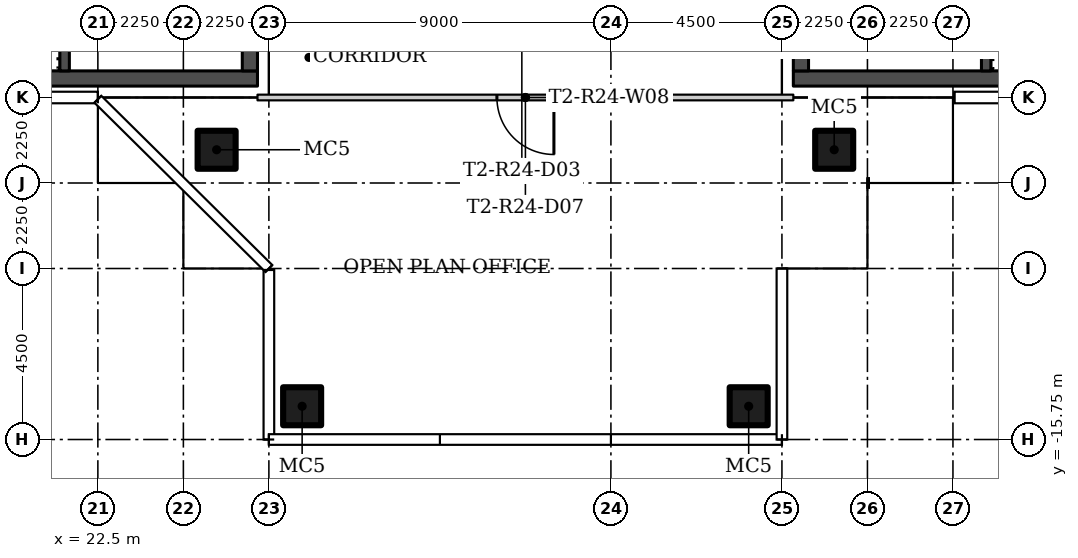
"""IFC4 building model, lengths in metres.
Left out: names, types, materials, properties, quantities, classifications, styles, units other than length and angle.
Written with IfcOpenShell. Run it as: python <this file> out.ifc"""

import sys

from ifc_helpers import new_model, si_unit, direction, frame, frame_2d, origin, origin_2d, place, context, subcontext, project, spatial, rectangle, hollow_rectangle, extrude, element, fill, save


model = new_model("IFC4")
c1 = context("Model", 3, precision=1e-05, world=origin(), true_north=direction((0.0, 1.0)))
c2 = subcontext(c1, "Body", "Model", "MODEL_VIEW")
j1 = project(units=[si_unit("LENGTHUNIT", "METRE"), si_unit("PLANEANGLEUNIT", "RADIAN")], contexts=[c1])
p1 = place(None, origin())
s1 = spatial("IfcSite", under=j1, at=p1, CompositionType="ELEMENT")
p2 = place(p1, origin())
s2 = spatial("IfcBuilding", under=s1, at=p2, CompositionType="ELEMENT")
p3 = place(p2, frame((0.0, 0.0, 221.7)))
s3 = spatial("IfcBuildingStorey", under=s2, at=p3, CompositionType="ELEMENT", Elevation=221.7)
for number, where in (
    (1, (25.625, -8.125, 0.0)),
    (2, (41.875, -8.125, 0.0)),
    (3, (39.625, -14.875, 0.0)),
    (4, (27.875, -14.875, 0.0)),
):
    element("IfcColumn", number, at=place(p3, frame(where)), inside=s3, PredefinedType="COLUMN", context=c2, shape_type="SweptSolid", body=[
        extrude(hollow_rectangle(XDim=1.0, YDim=1.0, WallThickness=0.04, at=origin_2d()), origin(), (0.0, 0.0, 1.0), 3.45),
    ])
p4 = place(p3, frame((40.8, -6.75, 0.0), z_axis=(0.0, 0.0, 1.0), x_axis=(-1.0, 0.0, 0.0)))
e5 = element("IfcWall", 5, at=p4, inside=s3, PredefinedType="PARTITIONING", context=c2, shape_type="SweptSolid", body=[
    extrude(rectangle(XDim=14.1, YDim=0.15, at=frame_2d((7.05, 0.0))), origin(), (0.0, 0.0, 1.0), 3.45),
])
p5 = place(p4, frame((6.3, 0.0, 0.0)))
e6 = element("IfcOpeningElement", 6, at=p5, cuts=e5, PredefinedType="OPENING", context=c2, shape_type="SweptSolid", body=[
    extrude(rectangle(XDim=1.5, YDim=2.1, at=frame_2d((0.75, 1.05))), frame((0.0, 0.085, 0.0), z_axis=(0.0, -1.0, 0.0), x_axis=(1.0, 0.0, 0.0)), (0.0, 0.0, 1.0), 0.17),
])
p6 = place(p3, frame((13.8, -6.25, 0.0)))
e7 = element("IfcWall", 7, at=p6, inside=s3, PredefinedType="SHEAR", context=c2, shape_type="SweptSolid", body=[
    extrude(rectangle(XDim=12.9, YDim=0.4, at=frame_2d((6.45, 0.0))), origin(), (0.0, 0.0, 1.0), 3.45),
])
p7 = place(p3, frame((26.5, 6.05, 0.0), z_axis=(0.0, 0.0, 1.0), x_axis=(0.0, -1.0, 0.0)))
e8 = element("IfcWall", 8, at=p7, inside=s3, PredefinedType="SHEAR", context=c2, shape_type="SweptSolid", body=[
    extrude(rectangle(XDim=12.1, YDim=0.4, at=frame_2d((6.05, 0.0))), origin(), (0.0, 0.0, 1.0), 3.45),
])
p8 = place(p7, frame((10.1, 0.0, 0.0)))
e9 = element("IfcOpeningElement", 9, at=p8, cuts=e8, PredefinedType="OPENING", context=c2, shape_type="SweptSolid", body=[
    extrude(rectangle(XDim=1.2, YDim=2.1, at=frame_2d((0.6, 1.05))), frame((0.0, 0.21, 0.0), z_axis=(0.0, -1.0, 0.0), x_axis=(1.0, 0.0, 0.0)), (0.0, 0.0, 1.0), 0.42),
])
p9 = place(p7, frame((3.9, 0.0, 0.0)))
e10 = element("IfcOpeningElement", 10, at=p9, cuts=e8, PredefinedType="OPENING", context=c2, shape_type="SweptSolid", body=[
    extrude(rectangle(XDim=1.8, YDim=2.4, at=frame_2d((0.9, 1.2))), frame((0.0, 0.21, 0.0), z_axis=(0.0, -1.0, 0.0), x_axis=(1.0, 0.0, 0.0)), (0.0, 0.0, 1.0), 0.42),
])
p10 = place(p3, frame((21.625, -6.05, 0.0), z_axis=(0.0, 0.0, 1.0), x_axis=(0.0, 1.0, 0.0)))
e11 = element("IfcWall", 11, at=p10, inside=s3, PredefinedType="SHEAR", context=c2, shape_type="SweptSolid", body=[
    extrude(rectangle(XDim=2.55, YDim=0.25, at=frame_2d((1.275, 0.0))), origin(), (0.0, 0.0, 1.0), 3.45),
])
p11 = place(p3, frame((53.7, -6.25, 0.0), z_axis=(0.0, 0.0, 1.0), x_axis=(-1.0, 0.0, 0.0)))
e12 = element("IfcWall", 12, at=p11, inside=s3, PredefinedType="SHEAR", context=c2, shape_type="SweptSolid", body=[
    extrude(rectangle(XDim=12.9, YDim=0.4, at=frame_2d((6.45, 0.0))), origin(), (0.0, 0.0, 1.0), 3.45),
])
p12 = place(p3, frame((41.0, -6.05, 0.0), z_axis=(0.0, 0.0, 1.0), x_axis=(0.0, 1.0, 0.0)))
e13 = element("IfcWall", 13, at=p12, inside=s3, PredefinedType="SHEAR", context=c2, shape_type="SweptSolid", body=[
    extrude(rectangle(XDim=12.1, YDim=0.4, at=frame_2d((6.05, 0.0))), origin(), (0.0, 0.0, 1.0), 3.45),
])
p13 = place(p12, frame((0.8, 0.0, 0.0)))
e14 = element("IfcOpeningElement", 14, at=p13, cuts=e13, PredefinedType="OPENING", context=c2, shape_type="SweptSolid", body=[
    extrude(rectangle(XDim=1.2, YDim=2.1, at=frame_2d((0.6, 1.05))), frame((0.0, 0.21, 0.0), z_axis=(0.0, -1.0, 0.0), x_axis=(1.0, 0.0, 0.0)), (0.0, 0.0, 1.0), 0.42),
])
p14 = place(p12, frame((6.4, 0.0, 0.0)))
e15 = element("IfcOpeningElement", 15, at=p14, cuts=e13, PredefinedType="OPENING", context=c2, shape_type="SweptSolid", body=[
    extrude(rectangle(XDim=1.8, YDim=2.4, at=frame_2d((0.9, 1.2))), frame((0.0, 0.21, 0.0), z_axis=(0.0, -1.0, 0.0), x_axis=(1.0, 0.0, 0.0)), (0.0, 0.0, 1.0), 0.42),
])
p15 = place(p3, frame((45.875, -6.05, 0.0), z_axis=(0.0, 0.0, 1.0), x_axis=(0.0, 1.0, 0.0)))
e16 = element("IfcWall", 16, at=p15, inside=s3, PredefinedType="SHEAR", context=c2, shape_type="SweptSolid", body=[
    extrude(rectangle(XDim=2.55, YDim=0.25, at=frame_2d((1.275, 0.0))), origin(), (0.0, 0.0, 1.0), 3.45),
])
p16 = place(p5, origin())
e17 = element("IfcDoor", 17, at=p16, inside=s3, OperationType="DOUBLE_DOOR_SINGLE_SWING", PredefinedType="DOOR", context=c2, shape_type="SweptSolid", body=[
    extrude(rectangle(XDim=1.5, YDim=2.1, at=frame_2d((0.75, 1.05))), frame((0.0, 0.025, 0.0), z_axis=(0.0, -1.0, 0.0), x_axis=(1.0, 0.0, 0.0)), (0.0, 0.0, 1.0), 0.05),
])
fill(e6, e17)
save(model, sys.argv[1])
